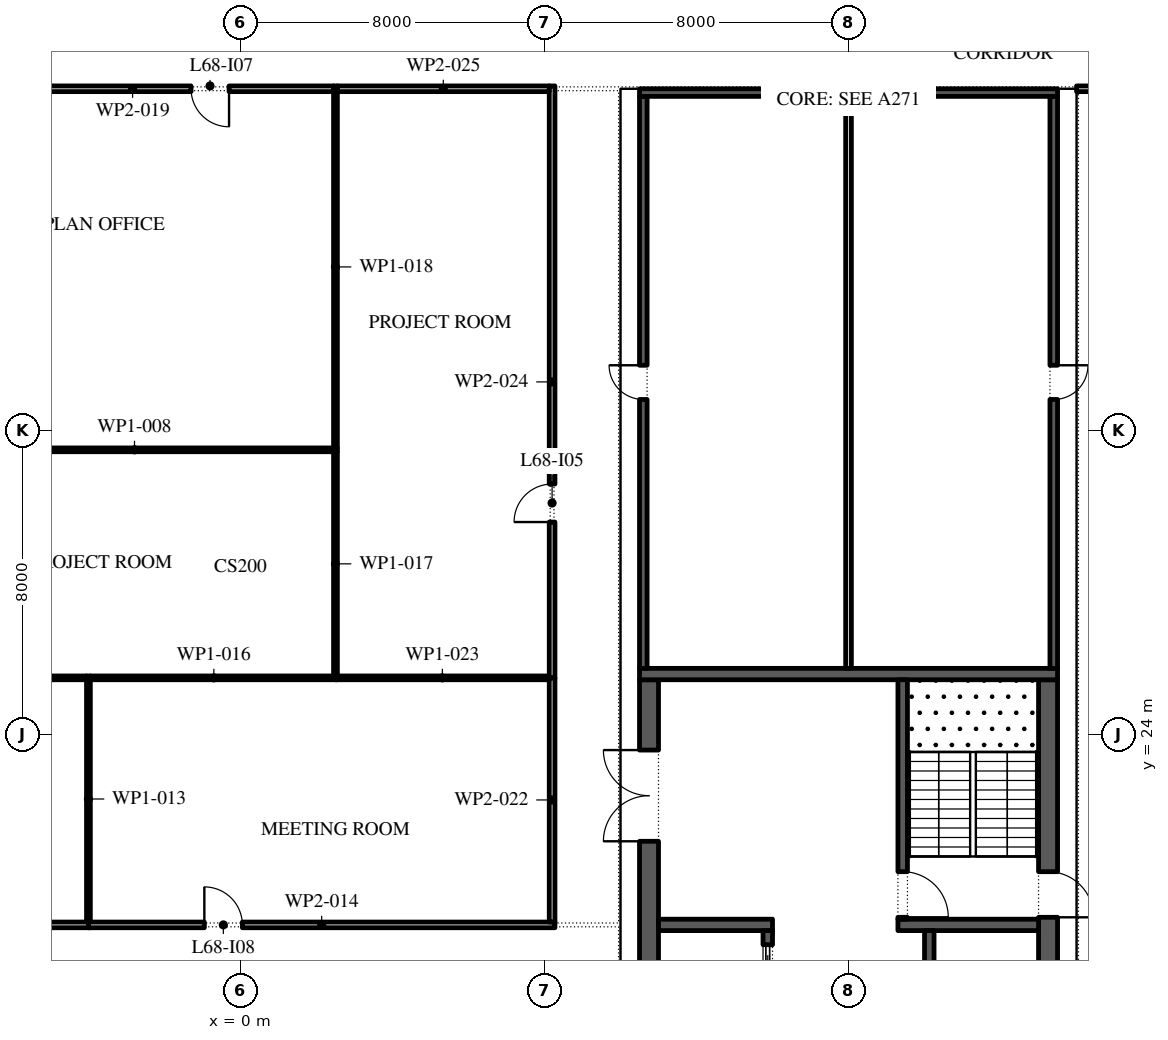
"""IFC4 building model, lengths in metres.
Left out: names, types, materials, properties, quantities, classifications, styles, units other than length and angle.
Written with IfcOpenShell. Run it as: python <this file> out.ifc"""

import sys

from ifc_helpers import new_model, si_unit, direction, frame, frame_2d, origin, place, context, subcontext, project, spatial, rectangle, extrude, element, fill, save


model = new_model("IFC4")
c1 = context("Model", 3, precision=1e-05, world=origin(), true_north=direction((0.0, 1.0)))
c2 = subcontext(c1, "Body", "Model", "MODEL_VIEW")
j1 = project(units=[si_unit("LENGTHUNIT", "METRE"), si_unit("PLANEANGLEUNIT", "RADIAN")], contexts=[c1])
p1 = place(None, origin())
s1 = spatial("IfcSite", under=j1, at=p1, CompositionType="ELEMENT")
p2 = place(p1, origin())
s2 = spatial("IfcBuilding", under=s1, at=p2, CompositionType="ELEMENT")
p3 = place(p2, frame((0.0, 0.0, 313.2)))
s3 = spatial("IfcBuildingStorey", under=s2, at=p3, CompositionType="ELEMENT", Elevation=313.2)
p4 = place(p3, frame((21.25, -2.45, 0.0), z_axis=(0.0, 0.0, 1.0), x_axis=(0.0, 1.0, 0.0)))
e1 = element("IfcWall", 1, at=p4, inside=s3, PredefinedType="SHEAR", context=c2, shape_type="SweptSolid", body=[
    extrude(rectangle(XDim=27.9, YDim=0.5, at=frame_2d((13.95, 0.0))), origin(), (0.0, 0.0, 1.0), 4.0),
])
p5 = place(p4, frame((5.05, 0.0, 0.0)))
e2 = element("IfcOpeningElement", 2, at=p5, cuts=e1, PredefinedType="OPENING", context=c2, shape_type="SweptSolid", body=[
    extrude(rectangle(XDim=1.2, YDim=2.1, at=frame_2d((0.6, 1.05))), frame((0.0, 0.26, 0.0), z_axis=(0.0, -1.0, 0.0), x_axis=(1.0, 0.0, 0.0)), (0.0, 0.0, 1.0), 0.52),
])
p6 = place(p4, frame((21.65, 0.0, 0.0)))
e3 = element("IfcOpeningElement", 3, at=p6, cuts=e1, PredefinedType="OPENING", context=c2, shape_type="SweptSolid", body=[
    extrude(rectangle(XDim=1.2, YDim=2.1, at=frame_2d((0.6, 1.05))), frame((0.0, 0.26, 0.0), z_axis=(0.0, -1.0, 0.0), x_axis=(1.0, 0.0, 0.0)), (0.0, 0.0, 1.0), 0.52),
])
p7 = place(p3, frame((10.75, -2.45, 0.0), z_axis=(0.0, 0.0, 1.0), x_axis=(0.0, 1.0, 0.0)))
e4 = element("IfcWall", 4, at=p7, inside=s3, PredefinedType="SHEAR", context=c2, shape_type="SweptSolid", body=[
    extrude(rectangle(XDim=27.9, YDim=0.5, at=frame_2d((13.95, 0.0))), origin(), (0.0, 0.0, 1.0), 4.0),
])
p8 = place(p7, frame((23.65, 0.0, 0.0)))
e5 = element("IfcOpeningElement", 5, at=p8, cuts=e4, PredefinedType="OPENING", context=c2, shape_type="SweptSolid", body=[
    extrude(rectangle(XDim=2.4, YDim=2.1, at=frame_2d((1.2, 1.05))), frame((0.0, 0.26, 0.0), z_axis=(0.0, -1.0, 0.0), x_axis=(1.0, 0.0, 0.0)), (0.0, 0.0, 1.0), 0.52),
])
p9 = place(p7, frame((1.387, 0.0, 0.0)))
e6 = element("IfcOpeningElement", 6, at=p9, cuts=e4, PredefinedType="OPENING", context=c2, shape_type="SweptSolid", body=[
    extrude(rectangle(XDim=0.9, YDim=2.1, at=frame_2d((0.45, 1.05))), frame((0.0, 0.26, 0.0), z_axis=(0.0, -1.0, 0.0), x_axis=(1.0, 0.0, 0.0)), (0.0, 0.0, 1.0), 0.52),
])
p10 = place(p7, frame((4.562, 0.0, 0.0)))
e7 = element("IfcOpeningElement", 7, at=p10, cuts=e4, PredefinedType="OPENING", context=c2, shape_type="SweptSolid", body=[
    extrude(rectangle(XDim=1.0, YDim=2.1, at=frame_2d((0.5, 1.05))), frame((0.0, 0.26, 0.0), z_axis=(0.0, -1.0, 0.0), x_axis=(1.0, 0.0, 0.0)), (0.0, 0.0, 1.0), 0.52),
])
p11 = place(p3, frame((10.5, 25.6, 0.0), z_axis=(0.0, 0.0, 1.0), x_axis=(1.0, 0.0, 0.0)))
e8 = element("IfcWall", 8, at=p11, inside=s3, PredefinedType="SHEAR", context=c2, shape_type="SweptSolid", body=[
    extrude(rectangle(XDim=11.0, YDim=0.3, at=frame_2d((5.5, 0.0))), origin(), (0.0, 0.0, 1.0), 4.0),
])
p12 = place(p3, frame((17.3, 19.0, 0.0), z_axis=(0.0, 0.0, 1.0), x_axis=(1.0, 0.0, 0.0)))
e9 = element("IfcWall", 9, at=p12, inside=s3, PredefinedType="SHEAR", context=c2, shape_type="SweptSolid", body=[
    extrude(rectangle(XDim=3.7, YDim=0.3, at=frame_2d((1.85, 0.0))), origin(), (0.0, 0.0, 1.0), 4.0),
])
p13 = place(p3, frame((17.425, 19.15, 0.0), z_axis=(0.0, 0.0, 1.0), x_axis=(0.0, 1.0, 0.0)))
e10 = element("IfcWall", 10, at=p13, inside=s3, PredefinedType="SHEAR", context=c2, shape_type="SweptSolid", body=[
    extrude(rectangle(XDim=6.3, YDim=0.25, at=frame_2d((3.15, 0.0))), origin(), (0.0, 0.0, 1.0), 4.0),
])
p14 = place(p13, frame((0.05, 0.0, 0.0)))
e11 = element("IfcOpeningElement", 11, at=p14, cuts=e10, PredefinedType="OPENING", context=c2, shape_type="SweptSolid", body=[
    extrude(rectangle(XDim=1.2, YDim=2.1, at=frame_2d((0.6, 1.05))), frame((0.0, 0.135, 0.0), z_axis=(0.0, -1.0, 0.0), x_axis=(1.0, 0.0, 0.0)), (0.0, 0.0, 1.0), 0.27),
])
p15 = place(p3, frame((18.125, 4.15, 0.0), z_axis=(0.0, 0.0, 1.0), x_axis=(0.0, 1.0, 0.0)))
e12 = element("IfcWall", 12, at=p15, inside=s3, PredefinedType="SHEAR", context=c2, shape_type="SweptSolid", body=[
    extrude(rectangle(XDim=14.7, YDim=0.25, at=frame_2d((7.35, 0.0))), origin(), (0.0, 0.0, 1.0), 4.0),
])
p16 = place(p15, frame((3.796, 0.0, 0.0)))
e13 = element("IfcOpeningElement", 13, at=p16, cuts=e12, PredefinedType="OPENING", context=c2, shape_type="SweptSolid", body=[
    extrude(rectangle(XDim=0.9, YDim=2.1, at=frame_2d((0.45, 1.05))), frame((0.0, 0.135, 0.0), z_axis=(0.0, -1.0, 0.0), x_axis=(1.0, 0.0, 0.0)), (0.0, 0.0, 1.0), 0.27),
])
p17 = place(p15, frame((8.0, 0.0, 0.0)))
e14 = element("IfcOpeningElement", 14, at=p17, cuts=e12, PredefinedType="OPENING", context=c2, shape_type="SweptSolid", body=[
    extrude(rectangle(XDim=0.9, YDim=2.1, at=frame_2d((0.45, 1.05))), frame((0.0, 0.135, 0.0), z_axis=(0.0, -1.0, 0.0), x_axis=(1.0, 0.0, 0.0)), (0.0, 0.0, 1.0), 0.27),
])
p18 = place(p15, frame((12.175, 0.0, 0.0)))
e15 = element("IfcOpeningElement", 15, at=p18, cuts=e12, PredefinedType="OPENING", context=c2, shape_type="SweptSolid", body=[
    extrude(rectangle(XDim=0.9, YDim=2.1, at=frame_2d((0.45, 1.05))), frame((0.0, 0.135, 0.0), z_axis=(0.0, -1.0, 0.0), x_axis=(1.0, 0.0, 0.0)), (0.0, 0.0, 1.0), 0.27),
])
p19 = place(p15, frame((0.371, 0.0, 0.0)))
e16 = element("IfcOpeningElement", 16, at=p19, cuts=e12, PredefinedType="OPENING", context=c2, shape_type="SweptSolid", body=[
    extrude(rectangle(XDim=1.1, YDim=2.1, at=frame_2d((0.55, 1.05))), frame((0.0, 0.135, 0.0), z_axis=(0.0, -1.0, 0.0), x_axis=(1.0, 0.0, 0.0)), (0.0, 0.0, 1.0), 0.27),
])
p20 = place(p3, frame((11.0, 19.0, 0.0), z_axis=(0.0, 0.0, 1.0), x_axis=(1.0, 0.0, 0.0)))
e17 = element("IfcWall", 17, at=p20, inside=s3, PredefinedType="SHEAR", context=c2, shape_type="SweptSolid", body=[
    extrude(rectangle(XDim=3.0, YDim=0.3, at=frame_2d((1.5, 0.0))), origin(), (0.0, 0.0, 1.0), 4.0),
])
p21 = place(p3, frame((13.875, -2.45, 0.0), z_axis=(0.0, 0.0, 1.0), x_axis=(0.0, 1.0, 0.0)))
e18 = element("IfcWall", 18, at=p21, inside=s3, PredefinedType="SHEAR", context=c2, shape_type="SweptSolid", body=[
    extrude(rectangle(XDim=21.3, YDim=0.25, at=frame_2d((10.65, 0.0))), origin(), (0.0, 0.0, 1.0), 4.0),
])
p22 = place(p21, frame((9.846, 0.0, 0.0)))
e19 = element("IfcOpeningElement", 19, at=p22, cuts=e18, PredefinedType="OPENING", context=c2, shape_type="SweptSolid", body=[
    extrude(rectangle(XDim=0.9, YDim=2.1, at=frame_2d((0.45, 1.05))), frame((0.0, 0.135, 0.0), z_axis=(0.0, -1.0, 0.0), x_axis=(1.0, 0.0, 0.0)), (0.0, 0.0, 1.0), 0.27),
])
p23 = place(p21, frame((12.911, 0.0, 0.0)))
e20 = element("IfcOpeningElement", 20, at=p23, cuts=e18, PredefinedType="OPENING", context=c2, shape_type="SweptSolid", body=[
    extrude(rectangle(XDim=0.9, YDim=2.1, at=frame_2d((0.45, 1.05))), frame((0.0, 0.135, 0.0), z_axis=(0.0, -1.0, 0.0), x_axis=(1.0, 0.0, 0.0)), (0.0, 0.0, 1.0), 0.27),
])
p24 = place(p21, frame((6.971, 0.0, 0.0)))
e21 = element("IfcOpeningElement", 21, at=p24, cuts=e18, PredefinedType="OPENING", context=c2, shape_type="SweptSolid", body=[
    extrude(rectangle(XDim=1.1, YDim=2.1, at=frame_2d((0.55, 1.05))), frame((0.0, 0.135, 0.0), z_axis=(0.0, -1.0, 0.0), x_axis=(1.0, 0.0, 0.0)), (0.0, 0.0, 1.0), 0.27),
])
p25 = place(p21, frame((15.543, 0.0, 0.0)))
e22 = element("IfcOpeningElement", 22, at=p25, cuts=e18, PredefinedType="OPENING", context=c2, shape_type="SweptSolid", body=[
    extrude(rectangle(XDim=1.1, YDim=2.1, at=frame_2d((0.55, 1.05))), frame((0.0, 0.135, 0.0), z_axis=(0.0, -1.0, 0.0), x_axis=(1.0, 0.0, 0.0)), (0.0, 0.0, 1.0), 0.27),
])
p26 = place(p21, frame((17.686, 0.0, 0.0)))
e23 = element("IfcOpeningElement", 23, at=p26, cuts=e18, PredefinedType="OPENING", context=c2, shape_type="SweptSolid", body=[
    extrude(rectangle(XDim=1.1, YDim=2.1, at=frame_2d((0.55, 1.05))), frame((0.0, 0.135, 0.0), z_axis=(0.0, -1.0, 0.0), x_axis=(1.0, 0.0, 0.0)), (0.0, 0.0, 1.0), 0.27),
])
p27 = place(p21, frame((19.829, 0.0, 0.0)))
e24 = element("IfcOpeningElement", 24, at=p27, cuts=e18, PredefinedType="OPENING", context=c2, shape_type="SweptSolid", body=[
    extrude(rectangle(XDim=1.1, YDim=2.1, at=frame_2d((0.55, 1.05))), frame((0.0, 0.135, 0.0), z_axis=(0.0, -1.0, 0.0), x_axis=(1.0, 0.0, 0.0)), (0.0, 0.0, 1.0), 0.27),
])
p28 = place(p3, frame((21.4, 25.75, 0.0), z_axis=(0.0, 0.0, 1.0), x_axis=(0.0, 1.0, 0.0)))
e25 = element("IfcWall", 25, at=p28, inside=s3, PredefinedType="SHEAR", context=c2, shape_type="SweptSolid", body=[
    extrude(rectangle(XDim=15.05, YDim=0.2, at=frame_2d((7.525, 0.0))), origin(), (0.0, 0.0, 1.0), 4.0),
])
p29 = place(p28, frame((7.075, 0.0, 0.0)))
e26 = element("IfcOpeningElement", 26, at=p29, cuts=e25, PredefinedType="OPENING", context=c2, shape_type="SweptSolid", body=[
    extrude(rectangle(XDim=0.9, YDim=2.1, at=frame_2d((0.45, 1.05))), frame((0.0, 0.11, 0.0), z_axis=(0.0, -1.0, 0.0), x_axis=(1.0, 0.0, 0.0)), (0.0, 0.0, 1.0), 0.22),
])
p30 = place(p3, frame((10.6, 25.75, 0.0), z_axis=(0.0, 0.0, 1.0), x_axis=(0.0, 1.0, 0.0)))
e27 = element("IfcWall", 27, at=p30, inside=s3, PredefinedType="SHEAR", context=c2, shape_type="SweptSolid", body=[
    extrude(rectangle(XDim=15.05, YDim=0.2, at=frame_2d((7.525, 0.0))), origin(), (0.0, 0.0, 1.0), 4.0),
])
p31 = place(p30, frame((7.075, 0.0, 0.0)))
e28 = element("IfcOpeningElement", 28, at=p31, cuts=e27, PredefinedType="OPENING", context=c2, shape_type="SweptSolid", body=[
    extrude(rectangle(XDim=0.9, YDim=2.1, at=frame_2d((0.45, 1.05))), frame((0.0, 0.11, 0.0), z_axis=(0.0, -1.0, 0.0), x_axis=(1.0, 0.0, 0.0)), (0.0, 0.0, 1.0), 0.22),
])
p32 = place(p3, frame((10.5, 40.9, 0.0), z_axis=(0.0, 0.0, 1.0), x_axis=(1.0, 0.0, 0.0)))
e29 = element("IfcWall", 29, at=p32, inside=s3, PredefinedType="SHEAR", context=c2, shape_type="SweptSolid", body=[
    extrude(rectangle(XDim=11.0, YDim=0.2, at=frame_2d((5.5, 0.0))), origin(), (0.0, 0.0, 1.0), 4.0),
])
p33 = place(p3, frame((16.0, 25.75, 0.0), z_axis=(0.0, 0.0, 1.0), x_axis=(0.0, 1.0, 0.0)))
e30 = element("IfcWall", 30, at=p33, inside=s3, PredefinedType="PARTITIONING", context=c2, shape_type="SweptSolid", body=[
    extrude(rectangle(XDim=15.05, YDim=0.15, at=frame_2d((7.525, 0.0))), origin(), (0.0, 0.0, 1.0), 4.0),
])
p34 = place(p3, frame((-8.275, 19.0, 0.0), z_axis=(0.0, 0.0, 1.0), x_axis=(1.0, 0.0, 0.0)))
e31 = element("IfcWall", 31, at=p34, inside=s3, PredefinedType="PARTITIONING", context=c2, shape_type="SweptSolid", body=[
    extrude(rectangle(XDim=4.325, YDim=0.15, at=frame_2d((2.163, 0.0))), origin(), (0.0, 0.0, 1.0), 4.0),
])
p35 = place(p3, frame((-8.125, 31.5, 0.0), z_axis=(0.0, 0.0, 1.0), x_axis=(1.0, 0.0, 0.0)))
e32 = element("IfcWall", 32, at=p35, inside=s3, PredefinedType="PARTITIONING", context=c2, shape_type="SweptSolid", body=[
    extrude(rectangle(XDim=10.675, YDim=0.1, at=frame_2d((5.337, 0.0))), origin(), (0.0, 0.0, 1.0), 4.0),
])
p36 = place(p3, frame((-4.0, 19.075, 0.0), z_axis=(0.0, 0.0, 1.0), x_axis=(0.0, 1.0, 0.0)))
e33 = element("IfcWall", 33, at=p36, inside=s3, PredefinedType="PARTITIONING", context=c2, shape_type="SweptSolid", body=[
    extrude(rectangle(XDim=6.475, YDim=0.1, at=frame_2d((3.238, 0.0))), origin(), (0.0, 0.0, 1.0), 4.0),
])
p37 = place(p3, frame((-4.0, 19.0, 0.0), z_axis=(0.0, 0.0, 1.0), x_axis=(1.0, 0.0, 0.0)))
e34 = element("IfcWall", 34, at=p37, inside=s3, PredefinedType="PARTITIONING", context=c2, shape_type="SweptSolid", body=[
    extrude(rectangle(XDim=12.275, YDim=0.15, at=frame_2d((6.137, 0.0))), origin(), (0.0, 0.0, 1.0), 4.0),
])
p38 = place(p37, frame((3.05, 0.0, 0.0)))
e35 = element("IfcOpeningElement", 35, at=p38, cuts=e34, PredefinedType="OPENING", context=c2, shape_type="SweptSolid", body=[
    extrude(rectangle(XDim=1.0, YDim=2.1, at=frame_2d((0.5, 1.05))), frame((0.0, 0.085, 0.0), z_axis=(0.0, -1.0, 0.0), x_axis=(1.0, 0.0, 0.0)), (0.0, 0.0, 1.0), 0.17),
])
p39 = place(p3, frame((-4.05, 25.5, 0.0), z_axis=(0.0, 0.0, 1.0), x_axis=(-1.0, 0.0, 0.0)))
e36 = element("IfcWall", 36, at=p39, inside=s3, PredefinedType="PARTITIONING", context=c2, shape_type="SweptSolid", body=[
    extrude(rectangle(XDim=4.075, YDim=0.1, at=frame_2d((2.038, 0.0))), origin(), (0.0, 0.0, 1.0), 4.0),
])
p40 = place(p3, frame((2.55, 25.5, 0.0), z_axis=(0.0, 0.0, 1.0), x_axis=(-1.0, 0.0, 0.0)))
e37 = element("IfcWall", 37, at=p40, inside=s3, PredefinedType="PARTITIONING", context=c2, shape_type="SweptSolid", body=[
    extrude(rectangle(XDim=6.5, YDim=0.1, at=frame_2d((3.25, 0.0))), origin(), (0.0, 0.0, 1.0), 4.0),
])
p41 = place(p3, frame((2.5, 25.55, 0.0), z_axis=(0.0, 0.0, 1.0), x_axis=(0.0, 1.0, 0.0)))
e38 = element("IfcWall", 38, at=p41, inside=s3, PredefinedType="PARTITIONING", context=c2, shape_type="SweptSolid", body=[
    extrude(rectangle(XDim=5.9, YDim=0.1, at=frame_2d((2.95, 0.0))), origin(), (0.0, 0.0, 1.0), 4.0),
])
p42 = place(p3, frame((2.5, 31.55, 0.0), z_axis=(0.0, 0.0, 1.0), x_axis=(0.0, 1.0, 0.0)))
e39 = element("IfcWall", 39, at=p42, inside=s3, PredefinedType="PARTITIONING", context=c2, shape_type="SweptSolid", body=[
    extrude(rectangle(XDim=9.525, YDim=0.1, at=frame_2d((4.762, 0.0))), origin(), (0.0, 0.0, 1.0), 4.0),
])
p43 = place(p3, frame((2.45, 41.0, 0.0), z_axis=(0.0, 0.0, 1.0), x_axis=(-1.0, 0.0, 0.0)))
e40 = element("IfcWall", 40, at=p43, inside=s3, PredefinedType="PARTITIONING", context=c2, shape_type="SweptSolid", body=[
    extrude(rectangle(XDim=10.575, YDim=0.15, at=frame_2d((5.288, 0.0))), origin(), (0.0, 0.0, 1.0), 4.0),
])
p44 = place(p43, frame((2.75, 0.0, 0.0)))
e41 = element("IfcOpeningElement", 41, at=p44, cuts=e40, PredefinedType="OPENING", context=c2, shape_type="SweptSolid", body=[
    extrude(rectangle(XDim=1.0, YDim=2.1, at=frame_2d((0.5, 1.05))), frame((0.0, 0.085, 0.0), z_axis=(0.0, -1.0, 0.0), x_axis=(1.0, 0.0, 0.0)), (0.0, 0.0, 1.0), 0.17),
])
p45 = place(p3, frame((8.2, 19.075, 0.0), z_axis=(0.0, 0.0, 1.0), x_axis=(0.0, 1.0, 0.0)))
e42 = element("IfcWall", 42, at=p45, inside=s3, PredefinedType="PARTITIONING", context=c2, shape_type="SweptSolid", body=[
    extrude(rectangle(XDim=6.425, YDim=0.15, at=frame_2d((3.212, 0.0))), origin(), (0.0, 0.0, 1.0), 4.0),
])
p46 = place(p3, frame((8.125, 25.5, 0.0), z_axis=(0.0, 0.0, 1.0), x_axis=(-1.0, 0.0, 0.0)))
e43 = element("IfcWall", 43, at=p46, inside=s3, PredefinedType="PARTITIONING", context=c2, shape_type="SweptSolid", body=[
    extrude(rectangle(XDim=5.625, YDim=0.1, at=frame_2d((2.812, 0.0))), origin(), (0.0, 0.0, 1.0), 4.0),
])
p47 = place(p3, frame((8.2, 25.5, 0.0), z_axis=(0.0, 0.0, 1.0), x_axis=(0.0, 1.0, 0.0)))
e44 = element("IfcWall", 44, at=p47, inside=s3, PredefinedType="PARTITIONING", context=c2, shape_type="SweptSolid", body=[
    extrude(rectangle(XDim=15.575, YDim=0.15, at=frame_2d((7.788, 0.0))), origin(), (0.0, 0.0, 1.0), 4.0),
])
p48 = place(p47, frame((4.1, 0.0, 0.0)))
e45 = element("IfcOpeningElement", 45, at=p48, cuts=e44, PredefinedType="OPENING", context=c2, shape_type="SweptSolid", body=[
    extrude(rectangle(XDim=1.0, YDim=2.1, at=frame_2d((0.5, 1.05))), frame((0.0, 0.085, 0.0), z_axis=(0.0, -1.0, 0.0), x_axis=(1.0, 0.0, 0.0)), (0.0, 0.0, 1.0), 0.17),
])
p49 = place(p3, frame((8.125, 41.0, 0.0), z_axis=(0.0, 0.0, 1.0), x_axis=(-1.0, 0.0, 0.0)))
e46 = element("IfcWall", 46, at=p49, inside=s3, PredefinedType="PARTITIONING", context=c2, shape_type="SweptSolid", body=[
    extrude(rectangle(XDim=5.575, YDim=0.15, at=frame_2d((2.788, 0.0))), origin(), (0.0, 0.0, 1.0), 4.0),
])
p50 = place(p3, frame((26.05, 41.0, 0.0), z_axis=(0.0, 0.0, 1.0), x_axis=(-1.0, 0.0, 0.0)))
e47 = element("IfcWall", 47, at=p50, inside=s3, PredefinedType="PARTITIONING", context=c2, shape_type="SweptSolid", body=[
    extrude(rectangle(XDim=4.05, YDim=0.15, at=frame_2d((2.025, 0.0))), origin(), (0.0, 0.0, 1.0), 4.0),
])
p51 = place(p50, frame((1.9, 0.0, 0.0)))
e48 = element("IfcOpeningElement", 48, at=p51, cuts=e47, PredefinedType="OPENING", context=c2, shape_type="SweptSolid", body=[
    extrude(rectangle(XDim=1.0, YDim=2.1, at=frame_2d((0.5, 1.05))), frame((0.0, 0.085, 0.0), z_axis=(0.0, -1.0, 0.0), x_axis=(1.0, 0.0, 0.0)), (0.0, 0.0, 1.0), 0.17),
])
p52 = place(p27, origin())
e49 = element("IfcDoor", 49, at=p52, inside=s3, OperationType="SLIDING_TO_LEFT", PredefinedType="DOOR", context=c2, shape_type="SweptSolid", body=[
    extrude(rectangle(XDim=1.1, YDim=2.1, at=frame_2d((0.55, 1.05))), frame((0.0, 0.025, 0.0), z_axis=(0.0, -1.0, 0.0), x_axis=(1.0, 0.0, 0.0)), (0.0, 0.0, 1.0), 0.05),
])
fill(e24, e49)
p53 = place(p8, origin())
e50 = element("IfcDoor", 50, at=p53, inside=s3, OperationType="DOUBLE_DOOR_SINGLE_SWING", PredefinedType="DOOR", context=c2, shape_type="SweptSolid", body=[
    extrude(rectangle(XDim=2.4, YDim=2.1, at=frame_2d((1.2, 1.05))), frame((0.0, 0.025, 0.0), z_axis=(0.0, -1.0, 0.0), x_axis=(1.0, 0.0, 0.0)), (0.0, 0.0, 1.0), 0.05),
])
fill(e5, e50)
p54 = place(p14, frame((1.2, 0.0, 0.0), z_axis=(0.0, 0.0, 1.0), x_axis=(-1.0, 0.0, 0.0)))
e51 = element("IfcDoor", 51, at=p54, inside=s3, OperationType="SINGLE_SWING_LEFT", PredefinedType="DOOR", context=c2, shape_type="SweptSolid", body=[
    extrude(rectangle(XDim=1.2, YDim=2.1, at=frame_2d((0.6, 1.05))), frame((0.0, 0.025, 0.0), z_axis=(0.0, -1.0, 0.0), x_axis=(1.0, 0.0, 0.0)), (0.0, 0.0, 1.0), 0.05),
])
fill(e11, e51)
p55 = place(p6, frame((1.2, 0.0, 0.0), z_axis=(0.0, 0.0, 1.0), x_axis=(-1.0, 0.0, 0.0)))
e52 = element("IfcDoor", 52, at=p55, inside=s3, OperationType="SINGLE_SWING_LEFT", PredefinedType="DOOR", context=c2, shape_type="SweptSolid", body=[
    extrude(rectangle(XDim=1.2, YDim=2.1, at=frame_2d((0.6, 1.05))), frame((0.0, 0.025, 0.0), z_axis=(0.0, -1.0, 0.0), x_axis=(1.0, 0.0, 0.0)), (0.0, 0.0, 1.0), 0.05),
])
fill(e3, e52)
p56 = place(p29, frame((0.9, 0.15, 0.0), z_axis=(0.0, 0.0, 1.0), x_axis=(-1.0, 0.0, 0.0)))
e53 = element("IfcDoor", 53, at=p56, inside=s3, OperationType="SINGLE_SWING_RIGHT", PredefinedType="DOOR", context=c2, shape_type="SweptSolid", body=[
    extrude(rectangle(XDim=0.9, YDim=2.1, at=frame_2d((0.45, 1.05))), frame((0.0, 0.1, 0.0), z_axis=(0.0, -1.0, 0.0), x_axis=(1.0, 0.0, 0.0)), (0.0, 0.0, 1.0), 0.05),
])
fill(e26, e53)
p57 = place(p31, origin())
e54 = element("IfcDoor", 54, at=p57, inside=s3, OperationType="SINGLE_SWING_LEFT", PredefinedType="DOOR", context=c2, shape_type="SweptSolid", body=[
    extrude(rectangle(XDim=0.9, YDim=2.1, at=frame_2d((0.45, 1.05))), frame((0.0, -0.05, 0.0), z_axis=(0.0, -1.0, 0.0), x_axis=(1.0, 0.0, 0.0)), (0.0, 0.0, 1.0), 0.05),
])
fill(e28, e54)
p58 = place(p48, origin())
e55 = element("IfcDoor", 55, at=p58, inside=s3, OperationType="SINGLE_SWING_RIGHT", PredefinedType="DOOR", context=c2, shape_type="SweptSolid", body=[
    extrude(rectangle(XDim=1.0, YDim=2.1, at=frame_2d((0.5, 1.05))), frame((0.0, 0.025, 0.0), z_axis=(0.0, -1.0, 0.0), x_axis=(1.0, 0.0, 0.0)), (0.0, 0.0, 1.0), 0.05),
])
fill(e45, e55)
p59 = place(p44, origin())
e56 = element("IfcDoor", 56, at=p59, inside=s3, OperationType="SINGLE_SWING_RIGHT", PredefinedType="DOOR", context=c2, shape_type="SweptSolid", body=[
    extrude(rectangle(XDim=1.0, YDim=2.1, at=frame_2d((0.5, 1.05))), frame((0.0, 0.025, 0.0), z_axis=(0.0, -1.0, 0.0), x_axis=(1.0, 0.0, 0.0)), (0.0, 0.0, 1.0), 0.05),
])
fill(e41, e56)
p60 = place(p38, origin())
e57 = element("IfcDoor", 57, at=p60, inside=s3, OperationType="SINGLE_SWING_RIGHT", PredefinedType="DOOR", context=c2, shape_type="SweptSolid", body=[
    extrude(rectangle(XDim=1.0, YDim=2.1, at=frame_2d((0.5, 1.05))), frame((0.0, 0.025, 0.0), z_axis=(0.0, -1.0, 0.0), x_axis=(1.0, 0.0, 0.0)), (0.0, 0.0, 1.0), 0.05),
])
fill(e35, e57)
save(model, sys.argv[1])
